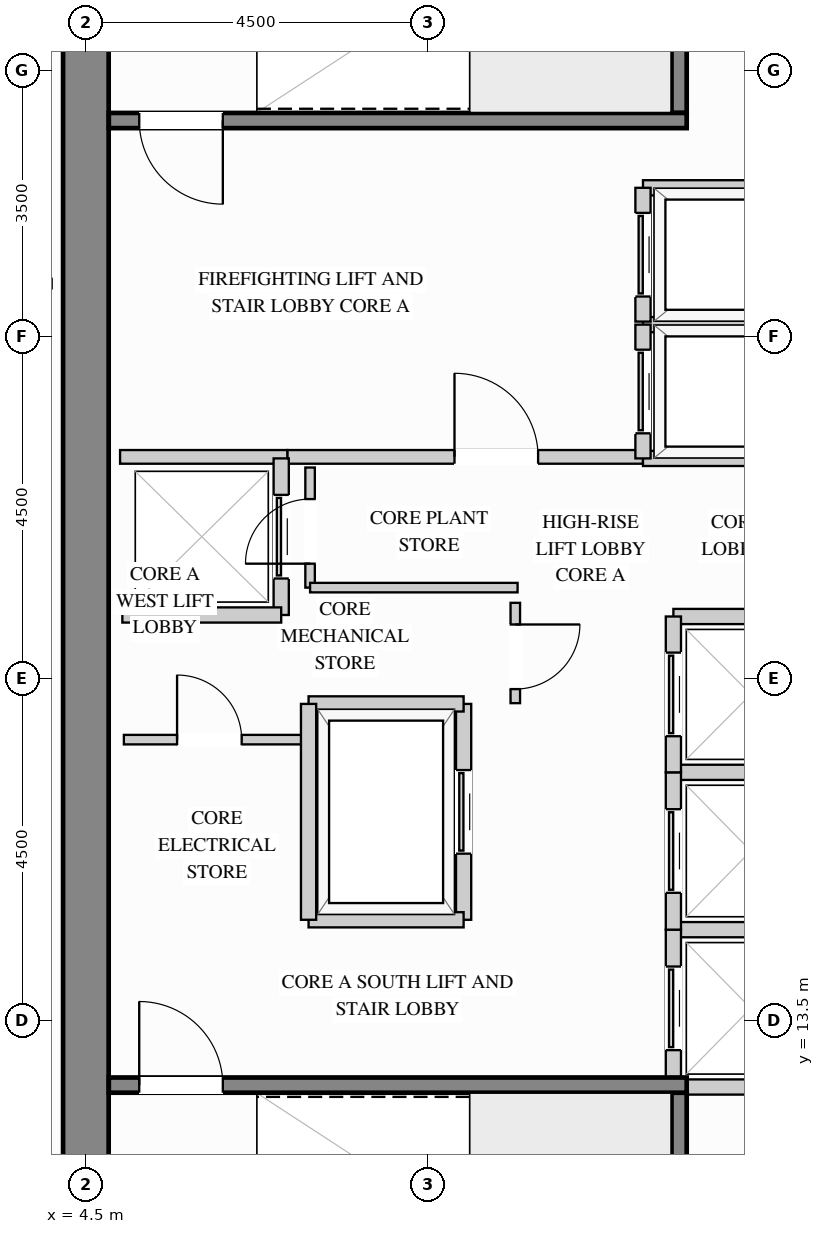
"""IFC4 building model, lengths in metres.
Left out: names, types, materials, properties, quantities, classifications, styles, units other than length and angle.
Written with IfcOpenShell. Run it as: python <this file> out.ifc"""

import sys

from ifc_helpers import new_model, si_unit, direction, frame, frame_2d, origin, place, context, subcontext, project, spatial, rectangle, extrude, source, transform, mapped, element, fill, save


model = new_model("IFC4")
c1 = context("Model", 3, precision=1e-05, world=origin(), true_north=direction((0.0, 1.0)))
c2 = subcontext(c1, "Body", "Model", "MODEL_VIEW")
j1 = project(units=[si_unit("LENGTHUNIT", "METRE"), si_unit("PLANEANGLEUNIT", "RADIAN")], contexts=[c1])
p1 = place(None, origin())
s1 = spatial("IfcSite", under=j1, at=p1, CompositionType="ELEMENT")
p2 = place(p1, origin())
s2 = spatial("IfcBuilding", under=s1, at=p2, CompositionType="ELEMENT")
p3 = place(p2, frame((0.0, 0.0, 153.9)))
s3 = spatial("IfcBuildingStorey", under=s2, at=p3, CompositionType="ELEMENT", Elevation=153.9)
m1 = source(origin(), c2, "Body", "SweptSolid", [
    extrude(rectangle(XDim=20.4, YDim=0.6, at=frame_2d((10.2, 0.0))), origin(), (0.0, 0.0, 1.0), 3.4),
])
p4 = place(p3, frame((4.5, 8.8, 0.0), z_axis=(0.0, 0.0, 1.0), x_axis=(0.0, 1.0, 0.0)))
e1 = element("IfcWall", 1, at=p4, inside=s3, PredefinedType="SHEAR", context=c2, shape_type="MappedRepresentation", body=[
    mapped(m1, transform((0.0, 0.0, 0.0), x_axis=(1.0, 0.0, 0.0), y_axis=(0.0, 1.0, 0.0), z_axis=(0.0, 0.0, 1.0))),
])
p5 = place(p3, frame((7.15, 20.92, 0.0), z_axis=(0.0, 0.0, 1.0), x_axis=(1.0, 0.0, 0.0)))
e2 = element("IfcWall", 2, at=p5, inside=s3, PredefinedType="PARTITIONING", context=c2, shape_type="SweptSolid", body=[
    extrude(rectangle(XDim=4.68, YDim=0.18, at=frame_2d((2.34, 0.0))), origin(), (0.0, 0.0, 1.0), 3.385),
])
p6 = place(p5, frame((2.2, 0.0, 0.0)))
e3 = element("IfcOpeningElement", 3, at=p6, cuts=e2, PredefinedType="OPENING", context=c2, shape_type="SweptSolid", body=[
    extrude(rectangle(XDim=1.1, YDim=2.15, at=frame_2d((0.55, 1.075))), frame((0.0, 0.1, 0.0), z_axis=(0.0, -1.0, 0.0), x_axis=(1.0, 0.0, 0.0)), (0.0, 0.0, 1.0), 0.2),
])
m2 = source(origin(), c2, "Body", "SweptSolid", [
    extrude(rectangle(XDim=2.2, YDim=0.18, at=frame_2d((1.1, 0.0))), origin(), (0.0, 0.0, 1.0), 3.385),
])
p7 = place(p3, frame((4.95, 20.92, 0.0), z_axis=(0.0, 0.0, 1.0), x_axis=(1.0, 0.0, 0.0)))
e4 = element("IfcWall", 4, at=p7, inside=s3, PredefinedType="PARTITIONING", context=c2, shape_type="MappedRepresentation", body=[
    mapped(m2, transform((0.0, 0.0, 0.0), x_axis=(1.0, 0.0, 0.0), y_axis=(0.0, 1.0, 0.0), z_axis=(0.0, 0.0, 1.0))),
])
p8 = place(p3, frame((10.15, 17.68, 0.0), z_axis=(0.0, 0.0, 1.0), x_axis=(0.0, 1.0, 0.0)))
e5 = element("IfcWall", 5, at=p8, inside=s3, PredefinedType="PARTITIONING", context=c2, shape_type="SweptSolid", body=[
    extrude(rectangle(XDim=1.32, YDim=0.125, at=frame_2d((0.66, 0.0))), origin(), (0.0, 0.0, 1.0), 3.385),
])
p9 = place(p8, frame((0.185, 0.0, 0.0)))
e6 = element("IfcOpeningElement", 6, at=p9, cuts=e5, PredefinedType="OPENING", context=c2, shape_type="SweptSolid", body=[
    extrude(rectangle(XDim=0.85, YDim=2.1, at=frame_2d((0.425, 1.05))), frame((0.0, 0.073, 0.0), z_axis=(0.0, -1.0, 0.0), x_axis=(1.0, 0.0, 0.0)), (0.0, 0.0, 1.0), 0.145),
])
p10 = place(p3, frame((7.45, 19.2, 0.0), z_axis=(0.0, 0.0, 1.0), x_axis=(0.0, 1.0, 0.0)))
e7 = element("IfcWall", 7, at=p10, inside=s3, PredefinedType="PARTITIONING", context=c2, shape_type="SweptSolid", body=[
    extrude(rectangle(XDim=1.58, YDim=0.125, at=frame_2d((0.79, 0.0))), origin(), (0.0, 0.0, 1.0), 3.385),
])
p11 = place(p10, frame((0.315, 0.0, 0.0)))
e8 = element("IfcOpeningElement", 8, at=p11, cuts=e7, PredefinedType="OPENING", context=c2, shape_type="SweptSolid", body=[
    extrude(rectangle(XDim=0.85, YDim=2.1, at=frame_2d((0.425, 1.05))), frame((0.0, 0.073, 0.0), z_axis=(0.0, -1.0, 0.0), x_axis=(1.0, 0.0, 0.0)), (0.0, 0.0, 1.0), 0.145),
])
m3 = source(origin(), c2, "Body", "SweptSolid", [
    extrude(rectangle(XDim=2.73, YDim=0.125, at=frame_2d((1.365, 0.0))), origin(), (0.0, 0.0, 1.0), 3.385),
])
p12 = place(p3, frame((7.45, 19.2, 0.0), z_axis=(0.0, 0.0, 1.0), x_axis=(1.0, 0.0, 0.0)))
e9 = element("IfcWall", 9, at=p12, inside=s3, PredefinedType="PARTITIONING", context=c2, shape_type="MappedRepresentation", body=[
    mapped(m3, transform((0.0, 0.0, 0.0), x_axis=(1.0, 0.0, 0.0), y_axis=(0.0, 1.0, 0.0), z_axis=(0.0, 0.0, 1.0))),
])
p13 = place(p3, frame((5.0, 17.2, 0.0), z_axis=(0.0, 0.0, 1.0), x_axis=(1.0, 0.0, 0.0)))
e10 = element("IfcWall", 10, at=p13, inside=s3, PredefinedType="PARTITIONING", context=c2, shape_type="SweptSolid", body=[
    extrude(rectangle(XDim=2.4, YDim=0.125, at=frame_2d((1.2, 0.0))), origin(), (0.0, 0.0, 1.0), 3.385),
])
p14 = place(p13, frame((0.7, 0.0, 0.0)))
e11 = element("IfcOpeningElement", 11, at=p14, cuts=e10, PredefinedType="OPENING", context=c2, shape_type="SweptSolid", body=[
    extrude(rectangle(XDim=0.85, YDim=2.1, at=frame_2d((0.425, 1.05))), frame((0.0, 0.073, 0.0), z_axis=(0.0, -1.0, 0.0), x_axis=(1.0, 0.0, 0.0)), (0.0, 0.0, 1.0), 0.145),
])
m4 = source(origin(), c2, "Body", "SweptSolid", [
    extrude(rectangle(XDim=3.698, YDim=0.125, at=frame_2d((1.849, 0.0))), origin(), (0.0, 0.0, 1.0), 3.385),
])
p15 = place(p3, frame((0.352, 23.2, 0.0), z_axis=(0.0, 0.0, 1.0), x_axis=(1.0, 0.0, 0.0)))
e12 = element("IfcWall", 12, at=p15, inside=s3, PredefinedType="PARTITIONING", context=c2, shape_type="MappedRepresentation", body=[
    mapped(m4, transform((0.0, 0.0, 0.0), x_axis=(1.0, 0.0, 0.0), y_axis=(0.0, 1.0, 0.0), z_axis=(0.0, 0.0, 1.0))),
])
m5 = source(origin(), c2, "Body", "SweptSolid", [
    extrude(rectangle(XDim=2.34, YDim=0.2, at=frame_2d((1.17, 0.0))), origin(), (0.0, 0.0, 1.0), 3.385),
])
for number, where, z_axis, x_axis in (
    (13, (11.83, 22.66, 0.0), (0.0, 0.0, 1.0), (1.0, 0.0, 0.0)),
    (14, (11.83, 20.9, 0.0), (0.0, 0.0, 1.0), (1.0, 0.0, 0.0)),
):
    element("IfcWall", number, at=place(p3, frame(where, z_axis=z_axis, x_axis=x_axis)), inside=s3, PredefinedType="PARTITIONING", context=c2, shape_type="MappedRepresentation", body=[
        mapped(m5, transform((0.0, 0.0, 0.0), x_axis=(1.0, 0.0, 0.0), y_axis=(0.0, 1.0, 0.0), z_axis=(0.0, 0.0, 1.0))),
    ])
p16 = place(p3, frame((11.83, 20.9, 0.0), z_axis=(0.0, 0.0, 1.0), x_axis=(0.0, 1.0, 0.0)))
e15 = element("IfcWall", 15, at=p16, inside=s3, PredefinedType="PARTITIONING", context=c2, shape_type="SweptSolid", body=[
    extrude(rectangle(XDim=1.76, YDim=0.2, at=frame_2d((0.88, 0.0))), origin(), (0.0, 0.0, 1.0), 3.385),
])
p17 = place(p16, frame((0.33, 0.0, 0.0)))
e16 = element("IfcOpeningElement", 16, at=p17, cuts=e15, PredefinedType="OPENING", context=c2, shape_type="SweptSolid", body=[
    extrude(rectangle(XDim=1.1, YDim=2.2, at=frame_2d((0.55, 1.1))), frame((0.0, 0.11, 0.0), z_axis=(0.0, -1.0, 0.0), x_axis=(1.0, 0.0, 0.0)), (0.0, 0.0, 1.0), 0.22),
])
p18 = place(p3, frame((11.83, 24.46, 0.0), z_axis=(0.0, 0.0, 1.0), x_axis=(1.0, 0.0, 0.0)))
e17 = element("IfcWall", 17, at=p18, inside=s3, PredefinedType="PARTITIONING", context=c2, shape_type="MappedRepresentation", body=[
    mapped(m5, transform((0.0, 0.0, 0.0), x_axis=(1.0, 0.0, 0.0), y_axis=(0.0, 1.0, 0.0), z_axis=(0.0, 0.0, 1.0))),
])
p19 = place(p3, frame((11.83, 22.7, 0.0), z_axis=(0.0, 0.0, 1.0), x_axis=(0.0, 1.0, 0.0)))
e18 = element("IfcWall", 18, at=p19, inside=s3, PredefinedType="PARTITIONING", context=c2, shape_type="SweptSolid", body=[
    extrude(rectangle(XDim=1.76, YDim=0.2, at=frame_2d((0.88, 0.0))), origin(), (0.0, 0.0, 1.0), 3.385),
])
p20 = place(p19, frame((0.33, 0.0, 0.0)))
e19 = element("IfcOpeningElement", 19, at=p20, cuts=e18, PredefinedType="OPENING", context=c2, shape_type="SweptSolid", body=[
    extrude(rectangle(XDim=1.1, YDim=2.2, at=frame_2d((0.55, 1.1))), frame((0.0, 0.11, 0.0), z_axis=(0.0, -1.0, 0.0), x_axis=(1.0, 0.0, 0.0)), (0.0, 0.0, 1.0), 0.22),
])
m6 = source(origin(), c2, "Body", "SweptSolid", [
    extrude(rectangle(XDim=1.94, YDim=0.2, at=frame_2d((0.97, 0.0))), origin(), (0.0, 0.0, 1.0), 3.385),
])
for number, where, z_axis, x_axis in (
    (20, (12.23, 14.7, 0.0), (0.0, 0.0, 1.0), (1.0, 0.0, 0.0)),
    (21, (12.23, 12.63, 0.0), (0.0, 0.0, 1.0), (1.0, 0.0, 0.0)),
):
    element("IfcWall", number, at=place(p3, frame(where, z_axis=z_axis, x_axis=x_axis)), inside=s3, PredefinedType="PARTITIONING", context=c2, shape_type="MappedRepresentation", body=[
        mapped(m6, transform((0.0, 0.0, 0.0), x_axis=(1.0, 0.0, 0.0), y_axis=(0.0, 1.0, 0.0), z_axis=(0.0, 0.0, 1.0))),
    ])
p21 = place(p3, frame((12.23, 12.63, 0.0), z_axis=(0.0, 0.0, 1.0), x_axis=(0.0, 1.0, 0.0)))
e22 = element("IfcWall", 22, at=p21, inside=s3, PredefinedType="PARTITIONING", context=c2, shape_type="SweptSolid", body=[
    extrude(rectangle(XDim=2.07, YDim=0.2, at=frame_2d((1.035, 0.0))), origin(), (0.0, 0.0, 1.0), 3.385),
])
p22 = place(p21, frame((0.485, 0.0, 0.0)))
e23 = element("IfcOpeningElement", 23, at=p22, cuts=e22, PredefinedType="OPENING", context=c2, shape_type="SweptSolid", body=[
    extrude(rectangle(XDim=1.1, YDim=2.2, at=frame_2d((0.55, 1.1))), frame((0.0, 0.11, 0.0), z_axis=(0.0, -1.0, 0.0), x_axis=(1.0, 0.0, 0.0)), (0.0, 0.0, 1.0), 0.22),
])
p23 = place(p3, frame((12.23, 16.77, 0.0), z_axis=(0.0, 0.0, 1.0), x_axis=(1.0, 0.0, 0.0)))
e24 = element("IfcWall", 24, at=p23, inside=s3, PredefinedType="PARTITIONING", context=c2, shape_type="MappedRepresentation", body=[
    mapped(m6, transform((0.0, 0.0, 0.0), x_axis=(1.0, 0.0, 0.0), y_axis=(0.0, 1.0, 0.0), z_axis=(0.0, 0.0, 1.0))),
])
p24 = place(p3, frame((12.23, 14.7, 0.0), z_axis=(0.0, 0.0, 1.0), x_axis=(0.0, 1.0, 0.0)))
e25 = element("IfcWall", 25, at=p24, inside=s3, PredefinedType="PARTITIONING", context=c2, shape_type="SweptSolid", body=[
    extrude(rectangle(XDim=2.07, YDim=0.2, at=frame_2d((1.035, 0.0))), origin(), (0.0, 0.0, 1.0), 3.385),
])
p25 = place(p24, frame((0.485, 0.0, 0.0)))
e26 = element("IfcOpeningElement", 26, at=p25, cuts=e25, PredefinedType="OPENING", context=c2, shape_type="SweptSolid", body=[
    extrude(rectangle(XDim=1.1, YDim=2.2, at=frame_2d((0.55, 1.1))), frame((0.0, 0.11, 0.0), z_axis=(0.0, -1.0, 0.0), x_axis=(1.0, 0.0, 0.0)), (0.0, 0.0, 1.0), 0.22),
])
p26 = place(p3, frame((12.23, 18.82, 0.0), z_axis=(0.0, 0.0, 1.0), x_axis=(1.0, 0.0, 0.0)))
e27 = element("IfcWall", 27, at=p26, inside=s3, PredefinedType="PARTITIONING", context=c2, shape_type="MappedRepresentation", body=[
    mapped(m6, transform((0.0, 0.0, 0.0), x_axis=(1.0, 0.0, 0.0), y_axis=(0.0, 1.0, 0.0), z_axis=(0.0, 0.0, 1.0))),
])
p27 = place(p3, frame((12.23, 16.77, 0.0), z_axis=(0.0, 0.0, 1.0), x_axis=(0.0, 1.0, 0.0)))
e28 = element("IfcWall", 28, at=p27, inside=s3, PredefinedType="PARTITIONING", context=c2, shape_type="SweptSolid", body=[
    extrude(rectangle(XDim=2.05, YDim=0.2, at=frame_2d((1.025, 0.0))), origin(), (0.0, 0.0, 1.0), 3.385),
])
p28 = place(p27, frame((0.475, 0.0, 0.0)))
e29 = element("IfcOpeningElement", 29, at=p28, cuts=e28, PredefinedType="OPENING", context=c2, shape_type="SweptSolid", body=[
    extrude(rectangle(XDim=1.1, YDim=2.2, at=frame_2d((0.55, 1.1))), frame((0.0, 0.11, 0.0), z_axis=(0.0, -1.0, 0.0), x_axis=(1.0, 0.0, 0.0)), (0.0, 0.0, 1.0), 0.22),
])
p29 = place(p3, frame((7.07, 18.84, 0.0), z_axis=(0.0, 0.0, 1.0), x_axis=(0.0, 1.0, 0.0)))
e30 = element("IfcWall", 30, at=p29, inside=s3, PredefinedType="PARTITIONING", context=c2, shape_type="SweptSolid", body=[
    extrude(rectangle(XDim=2.06, YDim=0.2, at=frame_2d((1.03, 0.0))), origin(), (0.0, 0.0, 1.0), 3.385),
])
p30 = place(p29, frame((0.48, 0.0, 0.0)))
e31 = element("IfcOpeningElement", 31, at=p30, cuts=e30, PredefinedType="OPENING", context=c2, shape_type="SweptSolid", body=[
    extrude(rectangle(XDim=1.1, YDim=2.2, at=frame_2d((0.55, 1.1))), frame((0.0, 0.11, 0.0), z_axis=(0.0, -1.0, 0.0), x_axis=(1.0, 0.0, 0.0)), (0.0, 0.0, 1.0), 0.22),
])
m7 = source(origin(), c2, "Body", "SweptSolid", [
    extrude(rectangle(XDim=2.09, YDim=0.2, at=frame_2d((1.045, 0.0))), origin(), (0.0, 0.0, 1.0), 3.385),
])
p31 = place(p3, frame((4.98, 18.84, 0.0), z_axis=(0.0, 0.0, 1.0), x_axis=(1.0, 0.0, 0.0)))
e32 = element("IfcWall", 32, at=p31, inside=s3, PredefinedType="PARTITIONING", context=c2, shape_type="MappedRepresentation", body=[
    mapped(m7, transform((0.0, 0.0, 0.0), x_axis=(1.0, 0.0, 0.0), y_axis=(0.0, 1.0, 0.0), z_axis=(0.0, 0.0, 1.0))),
])
p32 = place(p3, frame((9.47, 14.83, 0.0), z_axis=(0.0, 0.0, 1.0), x_axis=(0.0, 1.0, 0.0)))
e33 = element("IfcWall", 33, at=p32, inside=s3, PredefinedType="PARTITIONING", context=c2, shape_type="SweptSolid", body=[
    extrude(rectangle(XDim=2.84, YDim=0.2, at=frame_2d((1.42, 0.0))), origin(), (0.0, 0.0, 1.0), 3.385),
])
p33 = place(p32, frame((0.87, 0.0, 0.0)))
e34 = element("IfcOpeningElement", 34, at=p33, cuts=e33, PredefinedType="OPENING", context=c2, shape_type="SweptSolid", body=[
    extrude(rectangle(XDim=1.1, YDim=2.2, at=frame_2d((0.55, 1.1))), frame((0.0, 0.11, 0.0), z_axis=(0.0, -1.0, 0.0), x_axis=(1.0, 0.0, 0.0)), (0.0, 0.0, 1.0), 0.22),
])
m8 = source(origin(), c2, "Body", "SweptSolid", [
    extrude(rectangle(XDim=2.04, YDim=0.2, at=frame_2d((1.02, 0.0))), origin(), (0.0, 0.0, 1.0), 3.385),
])
for number, where, z_axis, x_axis in (
    (35, (7.43, 17.67, 0.0), (0.0, 0.0, 1.0), (1.0, 0.0, 0.0)),
    (36, (7.43, 14.83, 0.0), (0.0, 0.0, 1.0), (1.0, 0.0, 0.0)),
):
    element("IfcWall", number, at=place(p3, frame(where, z_axis=z_axis, x_axis=x_axis)), inside=s3, PredefinedType="PARTITIONING", context=c2, shape_type="MappedRepresentation", body=[
        mapped(m8, transform((0.0, 0.0, 0.0), x_axis=(1.0, 0.0, 0.0), y_axis=(0.0, 1.0, 0.0), z_axis=(0.0, 0.0, 1.0))),
    ])
m9 = source(origin(), c2, "Body", "SweptSolid", [
    extrude(rectangle(XDim=2.84, YDim=0.2, at=frame_2d((1.42, 0.0))), origin(), (0.0, 0.0, 1.0), 3.385),
])
p34 = place(p3, frame((7.43, 14.83, 0.0), z_axis=(0.0, 0.0, 1.0), x_axis=(0.0, 1.0, 0.0)))
e37 = element("IfcWall", 37, at=p34, inside=s3, PredefinedType="PARTITIONING", context=c2, shape_type="MappedRepresentation", body=[
    mapped(m9, transform((0.0, 0.0, 0.0), x_axis=(1.0, 0.0, 0.0), y_axis=(0.0, 1.0, 0.0), z_axis=(0.0, 0.0, 1.0))),
])
m10 = source(origin(), c2, "Body", "SweptSolid", [
    extrude(rectangle(XDim=3.753, YDim=0.2, at=frame_2d((1.876, 0.0))), origin(), (0.0, 0.0, 1.0), 3.4),
])
p35 = place(p3, frame((12.305, 8.802, 0.0), z_axis=(0.0, 0.0, 1.0), x_axis=(0.0, 1.0, 0.0)))
e38 = element("IfcWall", 38, at=p35, inside=s3, PredefinedType="SHEAR", context=c2, shape_type="MappedRepresentation", body=[
    mapped(m10, transform((0.0, 0.0, 0.0), x_axis=(1.0, 0.0, 0.0), y_axis=(0.0, 1.0, 0.0), z_axis=(0.0, 0.0, 1.0))),
])
p36 = place(p3, frame((4.802, 12.655, 0.0), z_axis=(0.0, 0.0, 1.0), x_axis=(1.0, 0.0, 0.0)))
e39 = element("IfcWall", 39, at=p36, inside=s3, PredefinedType="SHEAR", context=c2, shape_type="SweptSolid", body=[
    extrude(rectangle(XDim=7.603, YDim=0.2, at=frame_2d((3.802, 0.0))), origin(), (0.0, 0.0, 1.0), 3.4),
])
p37 = place(p36, frame((0.4, 0.0, 0.0)))
e40 = element("IfcOpeningElement", 40, at=p37, cuts=e39, PredefinedType="OPENING", context=c2, shape_type="SweptSolid", body=[
    extrude(rectangle(XDim=1.1, YDim=2.15, at=frame_2d((0.55, 1.075))), frame((0.0, 0.11, 0.0), z_axis=(0.0, -1.0, 0.0), x_axis=(1.0, 0.0, 0.0)), (0.0, 0.0, 1.0), 0.22),
])
p38 = place(p3, frame((12.305, 25.445, 0.0), z_axis=(0.0, 0.0, 1.0), x_axis=(0.0, 1.0, 0.0)))
e41 = element("IfcWall", 41, at=p38, inside=s3, PredefinedType="SHEAR", context=c2, shape_type="MappedRepresentation", body=[
    mapped(m10, transform((0.0, 0.0, 0.0), x_axis=(1.0, 0.0, 0.0), y_axis=(0.0, 1.0, 0.0), z_axis=(0.0, 0.0, 1.0))),
])
p39 = place(p3, frame((4.802, 25.345, 0.0), z_axis=(0.0, 0.0, 1.0), x_axis=(1.0, 0.0, 0.0)))
e42 = element("IfcWall", 42, at=p39, inside=s3, PredefinedType="SHEAR", context=c2, shape_type="SweptSolid", body=[
    extrude(rectangle(XDim=7.603, YDim=0.2, at=frame_2d((3.802, 0.0))), origin(), (0.0, 0.0, 1.0), 3.4),
])
p40 = place(p39, frame((0.4, 0.0, 0.0)))
e43 = element("IfcOpeningElement", 43, at=p40, cuts=e42, PredefinedType="OPENING", context=c2, shape_type="SweptSolid", body=[
    extrude(rectangle(XDim=1.1, YDim=2.15, at=frame_2d((0.55, 1.075))), frame((0.0, 0.11, 0.0), z_axis=(0.0, -1.0, 0.0), x_axis=(1.0, 0.0, 0.0)), (0.0, 0.0, 1.0), 0.22),
])
m11 = source(origin(), c2, "Body", "SweptSolid", [
    extrude(rectangle(XDim=1.1, YDim=2.15, at=frame_2d((0.55, 1.075))), frame((0.0, 0.025, 0.0), z_axis=(0.0, -1.0, 0.0), x_axis=(1.0, 0.0, 0.0)), (0.0, 0.0, 1.0), 0.05),
])
p41 = place(p6, origin())
e44 = element("IfcDoor", 44, at=p41, inside=s3, OperationType="SINGLE_SWING_LEFT", PredefinedType="DOOR", context=c2, shape_type="MappedRepresentation", body=[
    mapped(m11, transform((0.0, 0.0, 0.0), x_axis=(1.0, 0.0, 0.0), y_axis=(0.0, 1.0, 0.0), z_axis=(0.0, 0.0, 1.0))),
])
fill(e3, e44)
m12 = source(origin(), c2, "Body", "SweptSolid", [
    extrude(rectangle(XDim=1.1, YDim=2.2, at=frame_2d((0.55, 1.1))), frame((0.0, 0.025, 0.0), z_axis=(0.0, -1.0, 0.0), x_axis=(1.0, 0.0, 0.0)), (0.0, 0.0, 1.0), 0.05),
])
p42 = place(p17, origin())
e45 = element("IfcDoor", 45, at=p42, inside=s3, OperationType="SLIDING_TO_LEFT", PredefinedType="DOOR", context=c2, shape_type="MappedRepresentation", body=[
    mapped(m12, transform((0.0, 0.0, 0.0), x_axis=(1.0, 0.0, 0.0), y_axis=(0.0, 1.0, 0.0), z_axis=(0.0, 0.0, 1.0))),
])
fill(e16, e45)
p43 = place(p20, origin())
e46 = element("IfcDoor", 46, at=p43, inside=s3, OperationType="SLIDING_TO_LEFT", PredefinedType="DOOR", context=c2, shape_type="MappedRepresentation", body=[
    mapped(m12, transform((0.0, 0.0, 0.0), x_axis=(1.0, 0.0, 0.0), y_axis=(0.0, 1.0, 0.0), z_axis=(0.0, 0.0, 1.0))),
])
fill(e19, e46)
p44 = place(p22, origin())
e47 = element("IfcDoor", 47, at=p44, inside=s3, OperationType="SLIDING_TO_LEFT", PredefinedType="DOOR", context=c2, shape_type="MappedRepresentation", body=[
    mapped(m12, transform((0.0, 0.0, 0.0), x_axis=(1.0, 0.0, 0.0), y_axis=(0.0, 1.0, 0.0), z_axis=(0.0, 0.0, 1.0))),
])
fill(e23, e47)
p45 = place(p25, origin())
e48 = element("IfcDoor", 48, at=p45, inside=s3, OperationType="SLIDING_TO_LEFT", PredefinedType="DOOR", context=c2, shape_type="MappedRepresentation", body=[
    mapped(m12, transform((0.0, 0.0, 0.0), x_axis=(1.0, 0.0, 0.0), y_axis=(0.0, 1.0, 0.0), z_axis=(0.0, 0.0, 1.0))),
])
fill(e26, e48)
p46 = place(p28, origin())
e49 = element("IfcDoor", 49, at=p46, inside=s3, OperationType="SLIDING_TO_LEFT", PredefinedType="DOOR", context=c2, shape_type="MappedRepresentation", body=[
    mapped(m12, transform((0.0, 0.0, 0.0), x_axis=(1.0, 0.0, 0.0), y_axis=(0.0, 1.0, 0.0), z_axis=(0.0, 0.0, 1.0))),
])
fill(e29, e49)
p47 = place(p30, origin())
e50 = element("IfcDoor", 50, at=p47, inside=s3, OperationType="SLIDING_TO_LEFT", PredefinedType="DOOR", context=c2, shape_type="MappedRepresentation", body=[
    mapped(m12, transform((0.0, 0.0, 0.0), x_axis=(1.0, 0.0, 0.0), y_axis=(0.0, 1.0, 0.0), z_axis=(0.0, 0.0, 1.0))),
])
fill(e31, e50)
p48 = place(p33, origin())
e51 = element("IfcDoor", 51, at=p48, inside=s3, OperationType="SLIDING_TO_LEFT", PredefinedType="DOOR", context=c2, shape_type="MappedRepresentation", body=[
    mapped(m12, transform((0.0, 0.0, 0.0), x_axis=(1.0, 0.0, 0.0), y_axis=(0.0, 1.0, 0.0), z_axis=(0.0, 0.0, 1.0))),
])
fill(e34, e51)
m13 = source(origin(), c2, "Body", "SweptSolid", [
    extrude(rectangle(XDim=0.85, YDim=2.1, at=frame_2d((0.425, 1.05))), frame((0.0, 0.025, 0.0), z_axis=(0.0, -1.0, 0.0), x_axis=(1.0, 0.0, 0.0)), (0.0, 0.0, 1.0), 0.05),
])
p49 = place(p9, origin())
e52 = element("IfcDoor", 52, at=p49, inside=s3, OperationType="SINGLE_SWING_RIGHT", PredefinedType="DOOR", context=c2, shape_type="MappedRepresentation", body=[
    mapped(m13, transform((0.0, 0.0, 0.0), x_axis=(1.0, 0.0, 0.0), y_axis=(0.0, 1.0, 0.0), z_axis=(0.0, 0.0, 1.0))),
])
fill(e6, e52)
p50 = place(p14, origin())
e53 = element("IfcDoor", 53, at=p50, inside=s3, OperationType="SINGLE_SWING_LEFT", PredefinedType="DOOR", context=c2, shape_type="MappedRepresentation", body=[
    mapped(m13, transform((0.0, 0.0, 0.0), x_axis=(1.0, 0.0, 0.0), y_axis=(0.0, 1.0, 0.0), z_axis=(0.0, 0.0, 1.0))),
])
fill(e11, e53)
p51 = place(p11, origin())
e54 = element("IfcDoor", 54, at=p51, inside=s3, OperationType="SINGLE_SWING_LEFT", PredefinedType="DOOR", context=c2, shape_type="MappedRepresentation", body=[
    mapped(m13, transform((0.0, 0.0, 0.0), x_axis=(1.0, 0.0, 0.0), y_axis=(0.0, 1.0, 0.0), z_axis=(0.0, 0.0, 1.0))),
])
fill(e8, e54)
m14 = source(origin(), c2, "Body", "SweptSolid", [
    extrude(rectangle(XDim=1.1, YDim=2.15, at=frame_2d((0.55, 1.075))), frame((0.0, 0.025, 0.0), z_axis=(0.0, -1.0, 0.0), x_axis=(1.0, 0.0, 0.0)), (0.0, 0.0, 1.0), 0.05),
])
p52 = place(p37, origin())
e55 = element("IfcDoor", 55, at=p52, inside=s3, OperationType="SINGLE_SWING_LEFT", PredefinedType="DOOR", context=c2, shape_type="MappedRepresentation", body=[
    mapped(m14, transform((0.0, 0.0, 0.0), x_axis=(1.0, 0.0, 0.0), y_axis=(0.0, 1.0, 0.0), z_axis=(0.0, 0.0, 1.0))),
])
fill(e40, e55)
p53 = place(p40, origin())
e56 = element("IfcDoor", 56, at=p53, inside=s3, OperationType="SINGLE_SWING_RIGHT", PredefinedType="DOOR", context=c2, shape_type="MappedRepresentation", body=[
    mapped(m14, transform((0.0, 0.0, 0.0), x_axis=(1.0, 0.0, 0.0), y_axis=(0.0, 1.0, 0.0), z_axis=(0.0, 0.0, 1.0))),
])
fill(e43, e56)
save(model, sys.argv[1])
